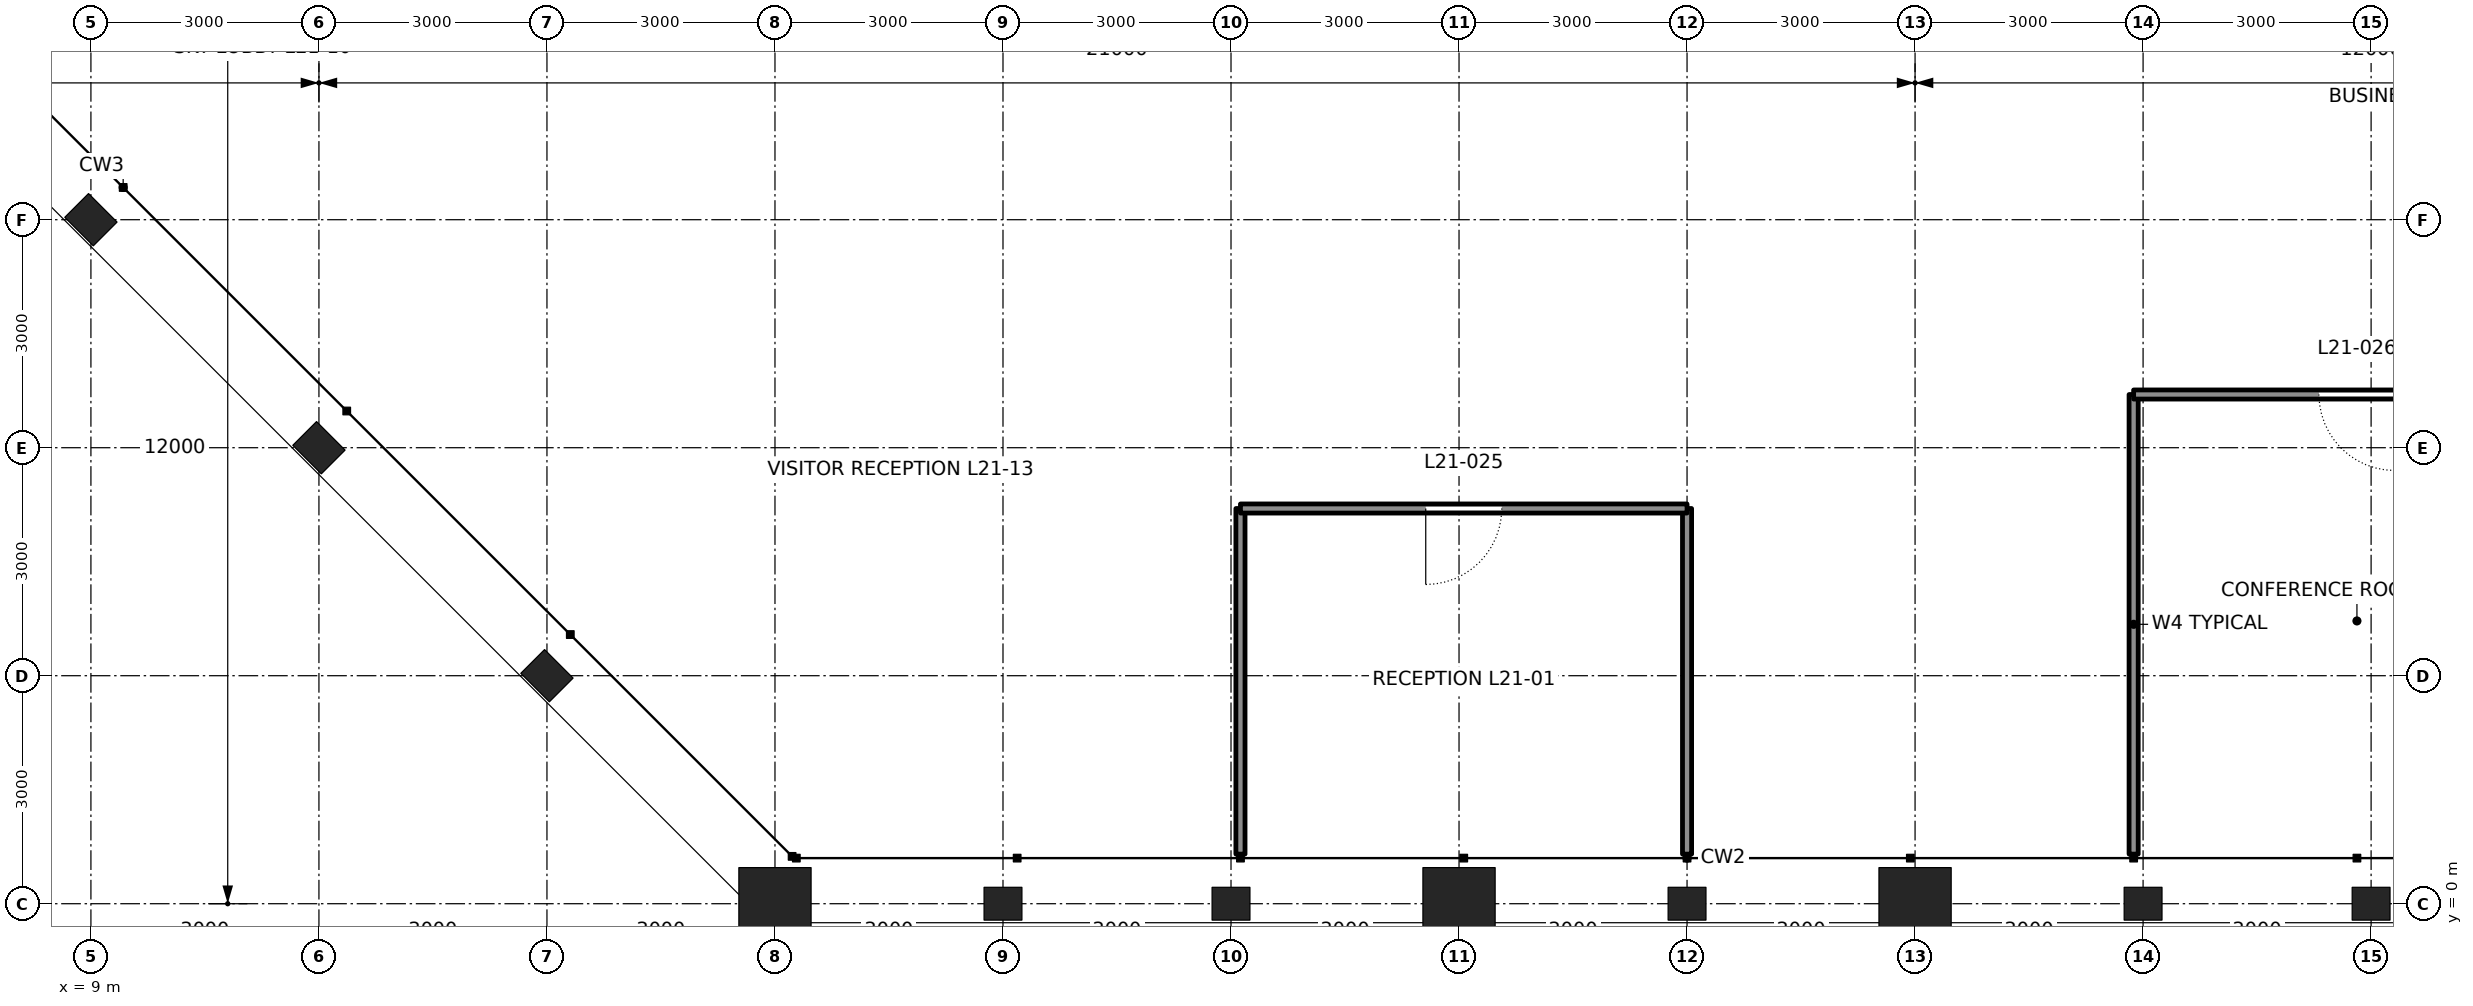
"""IFC4 building model, lengths in metres.
Left out: names, types, materials, properties, quantities, classifications, styles, units other than length and angle.
Written with IfcOpenShell. Run it as: python <this file> out.ifc"""

import sys

from ifc_helpers import new_model, si_unit, direction, frame, frame_2d, origin, origin_2d, place, context, subcontext, project, spatial, rectangle, hollow_rectangle, i_section, extrude, element, fill, save


model = new_model("IFC4")
c1 = context("Model", 3, precision=1e-05, world=origin(), true_north=direction((0.0, 1.0)))
c2 = subcontext(c1, "Body", "Model", "MODEL_VIEW")
j1 = project(units=[si_unit("LENGTHUNIT", "METRE"), si_unit("PLANEANGLEUNIT", "RADIAN")], contexts=[c1])
p1 = place(None, origin())
s1 = spatial("IfcSite", under=j1, at=p1, CompositionType="ELEMENT")
p2 = place(p1, origin())
s2 = spatial("IfcBuilding", under=s1, at=p2, CompositionType="ELEMENT")
p3 = place(p2, frame((0.0, 0.0, 102.3)))
s3 = spatial("IfcBuildingStorey", under=s2, at=p3, CompositionType="ELEMENT", Elevation=102.3)
p4 = place(p3, frame((18.0, 0.0, 0.0), z_axis=(0.0, 0.0, 1.0), x_axis=(0.0, -1.0, 0.0)))
e1 = element("IfcColumn", 1, at=p4, inside=s3, PredefinedType="COLUMN", context=c2, shape_type="SweptSolid", body=[
    extrude(hollow_rectangle(XDim=0.95, YDim=0.95, WallThickness=0.095, at=origin_2d()), origin(), (0.0, 0.0, 1.0), 4.5),
])
for number, where, z_axis, x_axis in (
    (2, (21.0, 0.0, 0.0), (0.0, 0.0, 1.0), (0.0, -1.0, 0.0)),
    (3, (24.0, 0.0, 0.0), (0.0, 0.0, 1.0), (0.0, -1.0, 0.0)),
):
    element("IfcColumn", number, at=place(p3, frame(where, z_axis=z_axis, x_axis=x_axis)), inside=s3, PredefinedType="COLUMN", context=c2, shape_type="SweptSolid", body=[
        extrude(i_section(OverallWidth=0.432, OverallDepth=0.498, WebThickness=0.056, FlangeThickness=0.089, at=origin_2d()), origin(), (0.0, 0.0, 1.0), 4.5),
    ])
p5 = place(p3, frame((27.0, 0.0, 0.0), z_axis=(0.0, 0.0, 1.0), x_axis=(0.0, -1.0, 0.0)))
e4 = element("IfcColumn", 4, at=p5, inside=s3, PredefinedType="COLUMN", context=c2, shape_type="SweptSolid", body=[
    extrude(hollow_rectangle(XDim=0.95, YDim=0.95, WallThickness=0.11, at=origin_2d()), origin(), (0.0, 0.0, 1.0), 4.5),
])
p6 = place(p3, frame((30.0, 0.0, 0.0), z_axis=(0.0, 0.0, 1.0), x_axis=(0.0, -1.0, 0.0)))
e5 = element("IfcColumn", 5, at=p6, inside=s3, PredefinedType="COLUMN", context=c2, shape_type="SweptSolid", body=[
    extrude(i_section(OverallWidth=0.432, OverallDepth=0.498, WebThickness=0.056, FlangeThickness=0.089, at=origin_2d()), origin(), (0.0, 0.0, 1.0), 4.5),
])
p7 = place(p3, frame((33.0, 0.0, 0.0), z_axis=(0.0, 0.0, 1.0), x_axis=(0.0, -1.0, 0.0)))
e6 = element("IfcColumn", 6, at=p7, inside=s3, PredefinedType="COLUMN", context=c2, shape_type="SweptSolid", body=[
    extrude(hollow_rectangle(XDim=0.95, YDim=0.95, WallThickness=0.11, at=origin_2d()), origin(), (0.0, 0.0, 1.0), 4.5),
])
for number, where, z_axis, x_axis in (
    (7, (36.0, 0.0, 0.0), (0.0, 0.0, 1.0), (0.0, -1.0, 0.0)),
    (8, (39.0, 0.0, 0.0), (0.0, 0.0, 1.0), (0.0, -1.0, 0.0)),
):
    element("IfcColumn", number, at=place(p3, frame(where, z_axis=z_axis, x_axis=x_axis)), inside=s3, PredefinedType="COLUMN", context=c2, shape_type="SweptSolid", body=[
        extrude(i_section(OverallWidth=0.432, OverallDepth=0.498, WebThickness=0.056, FlangeThickness=0.089, at=origin_2d()), origin(), (0.0, 0.0, 1.0), 4.5),
    ])
for number, where, z_axis, x_axis in (
    (9, (9.0, 9.0, -0.91), (0.0, 0.0, 1.0), (-0.707, -0.707, 0.0)),
    (10, (12.0, 6.0, -0.91), (0.0, 0.0, 1.0), (-0.707, -0.707, 0.0)),
    (11, (15.0, 3.0, -0.91), (0.0, 0.0, 1.0), (-0.707, -0.707, 0.0)),
):
    element("IfcColumn", number, at=place(p3, frame(where, z_axis=z_axis, x_axis=x_axis)), inside=s3, PredefinedType="COLUMN", context=c2, shape_type="SweptSolid", body=[
        extrude(i_section(OverallWidth=0.442, OverallDepth=0.531, WebThickness=0.066, FlangeThickness=0.106, at=origin_2d()), origin(), (0.0, 0.0, 1.0), 5.41),
    ])
for number, where, z_axis, x_axis in (
    (12, (24.124, 0.653, 0.0), (0.0, 0.0, 1.0), (0.0, 1.0, 0.0)),
    (13, (30.0, 0.653, 0.0), (0.0, 0.0, 1.0), (0.0, 1.0, 0.0)),
):
    element("IfcWall", number, at=place(p3, frame(where, z_axis=z_axis, x_axis=x_axis)), inside=s3, PredefinedType="PARTITIONING", context=c2, shape_type="SweptSolid", body=[
        extrude(rectangle(XDim=4.547, YDim=0.12, at=frame_2d((2.274, 0.0))), origin(), (0.0, 0.0, 1.0), 3.657),
    ])
p8 = place(p3, frame((35.876, 0.653, 0.0), z_axis=(0.0, 0.0, 1.0), x_axis=(0.0, 1.0, 0.0)))
e14 = element("IfcWall", 14, at=p8, inside=s3, PredefinedType="PARTITIONING", context=c2, shape_type="SweptSolid", body=[
    extrude(rectangle(XDim=6.047, YDim=0.12, at=frame_2d((3.024, 0.0))), origin(), (0.0, 0.0, 1.0), 4.34),
])
p9 = place(p3, frame((24.124, 5.2, 0.0), z_axis=(0.0, 0.0, 1.0), x_axis=(1.0, 0.0, 0.0)))
e15 = element("IfcWall", 15, at=p9, inside=s3, PredefinedType="PARTITIONING", context=c2, shape_type="SweptSolid", body=[
    extrude(rectangle(XDim=5.876, YDim=0.12, at=frame_2d((2.938, 0.0))), origin(), (0.0, 0.0, 1.0), 4.34),
])
p10 = place(p9, frame((2.438, 0.0, 0.0)))
e16 = element("IfcOpeningElement", 16, at=p10, cuts=e15, PredefinedType="OPENING", context=c2, shape_type="SweptSolid", body=[
    extrude(rectangle(XDim=1.0, YDim=2.4, at=frame_2d((0.5, 1.2))), frame((0.0, 0.07, 0.0), z_axis=(0.0, -1.0, 0.0), x_axis=(1.0, 0.0, 0.0)), (0.0, 0.0, 1.0), 0.14),
])
p11 = place(p3, frame((35.876, 6.7, 0.0), z_axis=(0.0, 0.0, 1.0), x_axis=(1.0, 0.0, 0.0)))
e17 = element("IfcWall", 17, at=p11, inside=s3, PredefinedType="PARTITIONING", context=c2, shape_type="SweptSolid", body=[
    extrude(rectangle(XDim=5.876, YDim=0.12, at=frame_2d((2.938, 0.0))), origin(), (0.0, 0.0, 1.0), 4.34),
])
p12 = place(p11, frame((2.438, 0.0, 0.0)))
e18 = element("IfcOpeningElement", 18, at=p12, cuts=e17, PredefinedType="OPENING", context=c2, shape_type="SweptSolid", body=[
    extrude(rectangle(XDim=1.0, YDim=2.4, at=frame_2d((0.5, 1.2))), frame((0.0, 0.07, 0.0), z_axis=(0.0, -1.0, 0.0), x_axis=(1.0, 0.0, 0.0)), (0.0, 0.0, 1.0), 0.14),
])
p13 = place(p10, frame((1.0, 0.0, 0.0), z_axis=(0.0, 0.0, 1.0), x_axis=(-1.0, 0.0, 0.0)))
e19 = element("IfcDoor", 19, at=p13, inside=s3, OperationType="SINGLE_SWING_RIGHT", PredefinedType="DOOR", context=c2, shape_type="SweptSolid", body=[
    extrude(rectangle(XDim=1.0, YDim=2.4, at=frame_2d((0.5, 1.2))), frame((0.0, 0.025, 0.0), z_axis=(0.0, -1.0, 0.0), x_axis=(1.0, 0.0, 0.0)), (0.0, 0.0, 1.0), 0.05),
])
fill(e16, e19)
p14 = place(p12, frame((1.0, 0.0, 0.0), z_axis=(0.0, 0.0, 1.0), x_axis=(-1.0, 0.0, 0.0)))
e20 = element("IfcDoor", 20, at=p14, inside=s3, OperationType="SINGLE_SWING_LEFT", PredefinedType="DOOR", context=c2, shape_type="SweptSolid", body=[
    extrude(rectangle(XDim=1.0, YDim=2.4, at=frame_2d((0.5, 1.2))), frame((0.0, 0.025, 0.0), z_axis=(0.0, -1.0, 0.0), x_axis=(1.0, 0.0, 0.0)), (0.0, 0.0, 1.0), 0.05),
])
fill(e18, e20)
save(model, sys.argv[1])
